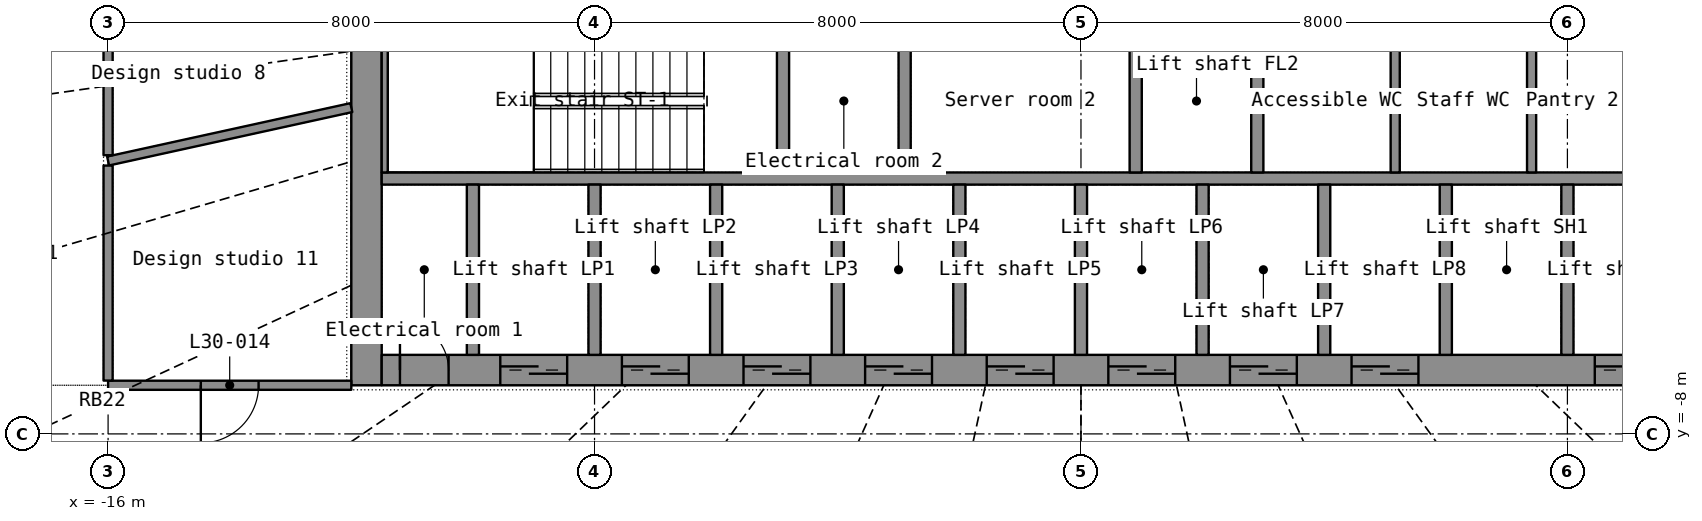
"""IFC4 building model, lengths in metres.
Left out: names, types, materials, properties, quantities, classifications, styles, units other than length and angle.
Written with IfcOpenShell. Run it as: python <this file> out.ifc"""

import sys

from ifc_helpers import new_model, si_unit, direction, frame, frame_2d, origin, place, context, subcontext, project, spatial, rectangle, extrude, element, fill, save


model = new_model("IFC4")
c1 = context("Model", 3, precision=1e-05, world=origin(), true_north=direction((0.0, 1.0)))
c2 = subcontext(c1, "Body", "Model", "MODEL_VIEW")
j1 = project(units=[si_unit("LENGTHUNIT", "METRE"), si_unit("PLANEANGLEUNIT", "RADIAN")], contexts=[c1])
p1 = place(None, origin())
s1 = spatial("IfcSite", under=j1, at=p1, CompositionType="ELEMENT")
p2 = place(p1, origin())
s2 = spatial("IfcBuilding", under=s1, at=p2, CompositionType="ELEMENT")
p3 = place(p2, frame((0.0, 0.0, 126.7)))
s3 = spatial("IfcBuildingStorey", under=s2, at=p3, CompositionType="ELEMENT", Elevation=126.7)
p4 = place(p3, frame((-11.75, -7.2, 0.0), z_axis=(0.0, 0.0, 1.0), x_axis=(0.0, 1.0, 0.0)))
e1 = element("IfcWall", 1, at=p4, inside=s3, PredefinedType="SHEAR", context=c2, shape_type="SweptSolid", body=[
    extrude(rectangle(XDim=14.4, YDim=0.5, at=frame_2d((7.2, 0.0))), origin(), (0.0, 0.0, 1.0), 3.3),
])
p5 = place(p4, frame((6.5, 0.0, 0.0)))
e2 = element("IfcOpeningElement", 2, at=p5, cuts=e1, PredefinedType="OPENING", context=c2, shape_type="SweptSolid", body=[
    extrude(rectangle(XDim=1.4, YDim=2.2, at=frame_2d((0.7, 1.1))), frame((0.0, 0.26, 0.0), z_axis=(0.0, -1.0, 0.0), x_axis=(1.0, 0.0, 0.0)), (0.0, 0.0, 1.0), 0.52),
])
p6 = place(p3, frame((-11.5, -6.95, 0.0), z_axis=(0.0, 0.0, 1.0), x_axis=(1.0, 0.0, 0.0)))
e3 = element("IfcWall", 3, at=p6, inside=s3, PredefinedType="SHEAR", context=c2, shape_type="SweptSolid", body=[
    extrude(rectangle(XDim=23.0, YDim=0.5, at=frame_2d((11.5, 0.0))), origin(), (0.0, 0.0, 1.0), 3.3),
])
p7 = place(p6, frame((1.95, 0.0, 0.0)))
e4 = element("IfcOpeningElement", 4, at=p7, cuts=e3, PredefinedType="OPENING", context=c2, shape_type="SweptSolid", body=[
    extrude(rectangle(XDim=1.1, YDim=2.2, at=frame_2d((0.55, 1.1))), frame((0.0, 0.26, 0.0), z_axis=(0.0, -1.0, 0.0), x_axis=(1.0, 0.0, 0.0)), (0.0, 0.0, 1.0), 0.52),
])
p8 = place(p6, frame((3.95, 0.0, 0.0)))
e5 = element("IfcOpeningElement", 5, at=p8, cuts=e3, PredefinedType="OPENING", context=c2, shape_type="SweptSolid", body=[
    extrude(rectangle(XDim=1.1, YDim=2.2, at=frame_2d((0.55, 1.1))), frame((0.0, 0.26, 0.0), z_axis=(0.0, -1.0, 0.0), x_axis=(1.0, 0.0, 0.0)), (0.0, 0.0, 1.0), 0.52),
])
p9 = place(p6, frame((5.95, 0.0, 0.0)))
e6 = element("IfcOpeningElement", 6, at=p9, cuts=e3, PredefinedType="OPENING", context=c2, shape_type="SweptSolid", body=[
    extrude(rectangle(XDim=1.1, YDim=2.2, at=frame_2d((0.55, 1.1))), frame((0.0, 0.26, 0.0), z_axis=(0.0, -1.0, 0.0), x_axis=(1.0, 0.0, 0.0)), (0.0, 0.0, 1.0), 0.52),
])
p10 = place(p6, frame((7.95, 0.0, 0.0)))
e7 = element("IfcOpeningElement", 7, at=p10, cuts=e3, PredefinedType="OPENING", context=c2, shape_type="SweptSolid", body=[
    extrude(rectangle(XDim=1.1, YDim=2.2, at=frame_2d((0.55, 1.1))), frame((0.0, 0.26, 0.0), z_axis=(0.0, -1.0, 0.0), x_axis=(1.0, 0.0, 0.0)), (0.0, 0.0, 1.0), 0.52),
])
p11 = place(p6, frame((9.95, 0.0, 0.0)))
e8 = element("IfcOpeningElement", 8, at=p11, cuts=e3, PredefinedType="OPENING", context=c2, shape_type="SweptSolid", body=[
    extrude(rectangle(XDim=1.1, YDim=2.2, at=frame_2d((0.55, 1.1))), frame((0.0, 0.26, 0.0), z_axis=(0.0, -1.0, 0.0), x_axis=(1.0, 0.0, 0.0)), (0.0, 0.0, 1.0), 0.52),
])
p12 = place(p6, frame((11.95, 0.0, 0.0)))
e9 = element("IfcOpeningElement", 9, at=p12, cuts=e3, PredefinedType="OPENING", context=c2, shape_type="SweptSolid", body=[
    extrude(rectangle(XDim=1.1, YDim=2.2, at=frame_2d((0.55, 1.1))), frame((0.0, 0.26, 0.0), z_axis=(0.0, -1.0, 0.0), x_axis=(1.0, 0.0, 0.0)), (0.0, 0.0, 1.0), 0.52),
])
p13 = place(p6, frame((13.95, 0.0, 0.0)))
e10 = element("IfcOpeningElement", 10, at=p13, cuts=e3, PredefinedType="OPENING", context=c2, shape_type="SweptSolid", body=[
    extrude(rectangle(XDim=1.1, YDim=2.2, at=frame_2d((0.55, 1.1))), frame((0.0, 0.26, 0.0), z_axis=(0.0, -1.0, 0.0), x_axis=(1.0, 0.0, 0.0)), (0.0, 0.0, 1.0), 0.52),
])
p14 = place(p6, frame((15.95, 0.0, 0.0)))
e11 = element("IfcOpeningElement", 11, at=p14, cuts=e3, PredefinedType="OPENING", context=c2, shape_type="SweptSolid", body=[
    extrude(rectangle(XDim=1.1, YDim=2.2, at=frame_2d((0.55, 1.1))), frame((0.0, 0.26, 0.0), z_axis=(0.0, -1.0, 0.0), x_axis=(1.0, 0.0, 0.0)), (0.0, 0.0, 1.0), 0.52),
])
p15 = place(p6, frame((19.95, 0.0, 0.0)))
e12 = element("IfcOpeningElement", 12, at=p15, cuts=e3, PredefinedType="OPENING", context=c2, shape_type="SweptSolid", body=[
    extrude(rectangle(XDim=1.1, YDim=2.2, at=frame_2d((0.55, 1.1))), frame((0.0, 0.26, 0.0), z_axis=(0.0, -1.0, 0.0), x_axis=(1.0, 0.0, 0.0)), (0.0, 0.0, 1.0), 0.52),
])
p16 = place(p6, frame((0.3, 0.0, 0.0)))
e13 = element("IfcOpeningElement", 13, at=p16, cuts=e3, PredefinedType="OPENING", context=c2, shape_type="SweptSolid", body=[
    extrude(rectangle(XDim=0.8, YDim=2.05, at=frame_2d((0.4, 1.025))), frame((0.0, 0.26, 0.0), z_axis=(0.0, -1.0, 0.0), x_axis=(1.0, 0.0, 0.0)), (0.0, 0.0, 1.0), 0.52),
])
p17 = place(p6, frame((21.9, 0.0, 0.0)))
e14 = element("IfcOpeningElement", 14, at=p17, cuts=e3, PredefinedType="OPENING", context=c2, shape_type="SweptSolid", body=[
    extrude(rectangle(XDim=0.8, YDim=2.05, at=frame_2d((0.4, 1.025))), frame((0.0, 0.26, 0.0), z_axis=(0.0, -1.0, 0.0), x_axis=(1.0, 0.0, 0.0)), (0.0, 0.0, 1.0), 0.52),
])
p18 = place(p3, frame((-11.5, -3.8, 0.0), z_axis=(0.0, 0.0, 1.0), x_axis=(1.0, 0.0, 0.0)))
e15 = element("IfcWall", 15, at=p18, inside=s3, PredefinedType="SHEAR", context=c2, shape_type="SweptSolid", body=[
    extrude(rectangle(XDim=23.0, YDim=0.2, at=frame_2d((11.5, 0.0))), origin(), (0.0, 0.0, 1.0), 3.3),
])
for number, where, z_axis, x_axis in (
    (16, (-10.0, -6.7, 0.0), (0.0, 0.0, 1.0), (0.0, 1.0, 0.0)),
    (17, (-8.0, -6.7, 0.0), (0.0, 0.0, 1.0), (0.0, 1.0, 0.0)),
    (18, (-6.0, -6.7, 0.0), (0.0, 0.0, 1.0), (0.0, 1.0, 0.0)),
    (19, (-4.0, -6.7, 0.0), (0.0, 0.0, 1.0), (0.0, 1.0, 0.0)),
    (20, (-2.0, -6.7, 0.0), (0.0, 0.0, 1.0), (0.0, 1.0, 0.0)),
    (21, (0.0, -6.7, 0.0), (0.0, 0.0, 1.0), (0.0, 1.0, 0.0)),
    (22, (2.0, -6.7, 0.0), (0.0, 0.0, 1.0), (0.0, 1.0, 0.0)),
    (23, (4.0, -6.7, 0.0), (0.0, 0.0, 1.0), (0.0, 1.0, 0.0)),
    (24, (6.0, -6.7, 0.0), (0.0, 0.0, 1.0), (0.0, 1.0, 0.0)),
    (25, (8.0, -6.7, 0.0), (0.0, 0.0, 1.0), (0.0, 1.0, 0.0)),
):
    element("IfcWall", number, at=place(p3, frame(where, z_axis=z_axis, x_axis=x_axis)), inside=s3, PredefinedType="SHEAR", context=c2, shape_type="SweptSolid", body=[
        extrude(rectangle(XDim=2.8, YDim=0.2, at=frame_2d((1.4, 0.0))), origin(), (0.0, 0.0, 1.0), 3.3),
    ])
p19 = place(p3, frame((-2.9, -3.7, 0.0), z_axis=(0.0, 0.0, 1.0), x_axis=(0.0, 1.0, 0.0)))
e26 = element("IfcWall", 26, at=p19, inside=s3, PredefinedType="SHEAR", context=c2, shape_type="SweptSolid", body=[
    extrude(rectangle(XDim=7.4, YDim=0.2, at=frame_2d((3.7, 0.0))), origin(), (0.0, 0.0, 1.0), 3.3),
])
p20 = place(p19, frame((3.1, 0.0, 0.0)))
e27 = element("IfcOpeningElement", 27, at=p20, cuts=e26, PredefinedType="OPENING", context=c2, shape_type="SweptSolid", body=[
    extrude(rectangle(XDim=1.2, YDim=2.2, at=frame_2d((0.6, 1.1))), frame((0.0, 0.11, 0.0), z_axis=(0.0, -1.0, 0.0), x_axis=(1.0, 0.0, 0.0)), (0.0, 0.0, 1.0), 0.22),
])
p21 = place(p3, frame((2.9, -3.7, 0.0), z_axis=(0.0, 0.0, 1.0), x_axis=(0.0, 1.0, 0.0)))
e28 = element("IfcWall", 28, at=p21, inside=s3, PredefinedType="SHEAR", context=c2, shape_type="SweptSolid", body=[
    extrude(rectangle(XDim=7.4, YDim=0.2, at=frame_2d((3.7, 0.0))), origin(), (0.0, 0.0, 1.0), 3.3),
])
p22 = place(p21, frame((3.1, 0.0, 0.0)))
e29 = element("IfcOpeningElement", 29, at=p22, cuts=e28, PredefinedType="OPENING", context=c2, shape_type="SweptSolid", body=[
    extrude(rectangle(XDim=1.2, YDim=2.2, at=frame_2d((0.6, 1.1))), frame((0.0, 0.11, 0.0), z_axis=(0.0, -1.0, 0.0), x_axis=(1.0, 0.0, 0.0)), (0.0, 0.0, 1.0), 0.22),
])
p23 = place(p3, frame((0.9, -3.7, 0.0), z_axis=(0.0, 0.0, 1.0), x_axis=(0.0, 1.0, 0.0)))
e30 = element("IfcWall", 30, at=p23, inside=s3, PredefinedType="SHEAR", context=c2, shape_type="SweptSolid", body=[
    extrude(rectangle(XDim=2.35, YDim=0.2, at=frame_2d((1.175, 0.0))), origin(), (0.0, 0.0, 1.0), 3.3),
])
p24 = place(p3, frame((-11.45, -3.7, 0.0), z_axis=(0.0, 0.0, 1.0), x_axis=(0.0, 1.0, 0.0)))
e31 = element("IfcWall", 31, at=p24, inside=s3, PredefinedType="SHEAR", context=c2, shape_type="SweptSolid", body=[
    extrude(rectangle(XDim=2.35, YDim=0.1, at=frame_2d((1.175, 0.0))), origin(), (0.0, 0.0, 1.0), 3.3),
])
p25 = place(p3, frame((-4.9, -3.7, 0.0), z_axis=(0.0, 0.0, 1.0), x_axis=(0.0, 1.0, 0.0)))
e32 = element("IfcWall", 32, at=p25, inside=s3, PredefinedType="SHEAR", context=c2, shape_type="SweptSolid", body=[
    extrude(rectangle(XDim=2.35, YDim=0.2, at=frame_2d((1.175, 0.0))), origin(), (0.0, 0.0, 1.0), 3.3),
])
for number, where, z_axis, x_axis in (
    (33, (5.168, -3.7, 0.0), (0.0, 0.0, 1.0), (0.0, 1.0, 0.0)),
    (34, (7.411, -3.7, 0.0), (0.0, 0.0, 1.0), (0.0, 1.0, 0.0)),
):
    element("IfcWall", number, at=place(p3, frame(where, z_axis=z_axis, x_axis=x_axis)), inside=s3, PredefinedType="PARTITIONING", context=c2, shape_type="SweptSolid", body=[
        extrude(rectangle(XDim=2.35, YDim=0.15, at=frame_2d((1.175, 0.0))), origin(), (0.0, 0.0, 1.0), 3.3),
    ])
p26 = place(p3, frame((-16.0, -3.512, 0.0), z_axis=(0.0, 0.0, 1.0), x_axis=(0.976750433, 0.214379551, 0.0)))
e35 = element("IfcWall", 35, at=p26, inside=s3, PredefinedType="PARTITIONING", context=c2, shape_type="SweptSolid", body=[
    extrude(rectangle(XDim=4.095, YDim=0.15, at=frame_2d((2.048, 0.0))), origin(), (0.0, 0.0, 1.0), 2.4),
])
p27 = place(p3, frame((-12.0, -7.2, 0.0), z_axis=(0.0, 0.0, 1.0), x_axis=(-1.0, 0.0, 0.0)))
e36 = element("IfcWall", 36, at=p27, inside=s3, PredefinedType="PARTITIONING", context=c2, shape_type="SweptSolid", body=[
    extrude(rectangle(XDim=4.0, YDim=0.15, at=frame_2d((2.0, 0.0))), origin(), (0.0, 0.0, 1.0), 2.4),
])
p28 = place(p27, frame((1.525, 0.0, 0.0)))
e37 = element("IfcOpeningElement", 37, at=p28, cuts=e36, PredefinedType="OPENING", context=c2, shape_type="SweptSolid", body=[
    extrude(rectangle(XDim=0.95, YDim=2.15, at=frame_2d((0.475, 1.075))), frame((0.0, 0.085, 0.0), z_axis=(0.0, -1.0, 0.0), x_axis=(1.0, 0.0, 0.0)), (0.0, 0.0, 1.0), 0.17),
])
p29 = place(p3, frame((-16.0, -7.123, 0.0), z_axis=(0.0, 0.0, 1.0), x_axis=(0.0, 1.0, 0.0)))
e38 = element("IfcWall", 38, at=p29, inside=s3, PredefinedType="PARTITIONING", context=c2, shape_type="SweptSolid", body=[
    extrude(rectangle(XDim=3.536, YDim=0.15, at=frame_2d((1.768, 0.0))), origin(), (0.0, 0.0, 1.0), 2.4),
])
p30 = place(p3, frame((-16.0, -3.417, 0.0), z_axis=(0.0, 0.0, 1.0), x_axis=(0.0, 1.0, 0.0)))
e39 = element("IfcWall", 39, at=p30, inside=s3, PredefinedType="PARTITIONING", context=c2, shape_type="SweptSolid", body=[
    extrude(rectangle(XDim=2.439, YDim=0.15, at=frame_2d((1.22, 0.0))), origin(), (0.0, 0.0, 1.0), 2.4),
])
p31 = place(p7, origin())
e40 = element("IfcDoor", 40, at=p31, inside=s3, OperationType="DOUBLE_DOOR_SLIDING", PredefinedType="DOOR", context=c2, shape_type="SweptSolid", body=[
    extrude(rectangle(XDim=1.1, YDim=2.2, at=frame_2d((0.55, 1.1))), frame((0.0, 0.025, 0.0), z_axis=(0.0, -1.0, 0.0), x_axis=(1.0, 0.0, 0.0)), (0.0, 0.0, 1.0), 0.05),
])
fill(e4, e40)
p32 = place(p8, origin())
e41 = element("IfcDoor", 41, at=p32, inside=s3, OperationType="DOUBLE_DOOR_SLIDING", PredefinedType="DOOR", context=c2, shape_type="SweptSolid", body=[
    extrude(rectangle(XDim=1.1, YDim=2.2, at=frame_2d((0.55, 1.1))), frame((0.0, 0.025, 0.0), z_axis=(0.0, -1.0, 0.0), x_axis=(1.0, 0.0, 0.0)), (0.0, 0.0, 1.0), 0.05),
])
fill(e5, e41)
p33 = place(p9, origin())
e42 = element("IfcDoor", 42, at=p33, inside=s3, OperationType="DOUBLE_DOOR_SLIDING", PredefinedType="DOOR", context=c2, shape_type="SweptSolid", body=[
    extrude(rectangle(XDim=1.1, YDim=2.2, at=frame_2d((0.55, 1.1))), frame((0.0, 0.025, 0.0), z_axis=(0.0, -1.0, 0.0), x_axis=(1.0, 0.0, 0.0)), (0.0, 0.0, 1.0), 0.05),
])
fill(e6, e42)
p34 = place(p10, origin())
e43 = element("IfcDoor", 43, at=p34, inside=s3, OperationType="DOUBLE_DOOR_SLIDING", PredefinedType="DOOR", context=c2, shape_type="SweptSolid", body=[
    extrude(rectangle(XDim=1.1, YDim=2.2, at=frame_2d((0.55, 1.1))), frame((0.0, 0.025, 0.0), z_axis=(0.0, -1.0, 0.0), x_axis=(1.0, 0.0, 0.0)), (0.0, 0.0, 1.0), 0.05),
])
fill(e7, e43)
p35 = place(p11, origin())
e44 = element("IfcDoor", 44, at=p35, inside=s3, OperationType="DOUBLE_DOOR_SLIDING", PredefinedType="DOOR", context=c2, shape_type="SweptSolid", body=[
    extrude(rectangle(XDim=1.1, YDim=2.2, at=frame_2d((0.55, 1.1))), frame((0.0, 0.025, 0.0), z_axis=(0.0, -1.0, 0.0), x_axis=(1.0, 0.0, 0.0)), (0.0, 0.0, 1.0), 0.05),
])
fill(e8, e44)
p36 = place(p12, origin())
e45 = element("IfcDoor", 45, at=p36, inside=s3, OperationType="DOUBLE_DOOR_SLIDING", PredefinedType="DOOR", context=c2, shape_type="SweptSolid", body=[
    extrude(rectangle(XDim=1.1, YDim=2.2, at=frame_2d((0.55, 1.1))), frame((0.0, 0.025, 0.0), z_axis=(0.0, -1.0, 0.0), x_axis=(1.0, 0.0, 0.0)), (0.0, 0.0, 1.0), 0.05),
])
fill(e9, e45)
p37 = place(p13, origin())
e46 = element("IfcDoor", 46, at=p37, inside=s3, OperationType="DOUBLE_DOOR_SLIDING", PredefinedType="DOOR", context=c2, shape_type="SweptSolid", body=[
    extrude(rectangle(XDim=1.1, YDim=2.2, at=frame_2d((0.55, 1.1))), frame((0.0, 0.025, 0.0), z_axis=(0.0, -1.0, 0.0), x_axis=(1.0, 0.0, 0.0)), (0.0, 0.0, 1.0), 0.05),
])
fill(e10, e46)
p38 = place(p14, origin())
e47 = element("IfcDoor", 47, at=p38, inside=s3, OperationType="DOUBLE_DOOR_SLIDING", PredefinedType="DOOR", context=c2, shape_type="SweptSolid", body=[
    extrude(rectangle(XDim=1.1, YDim=2.2, at=frame_2d((0.55, 1.1))), frame((0.0, 0.025, 0.0), z_axis=(0.0, -1.0, 0.0), x_axis=(1.0, 0.0, 0.0)), (0.0, 0.0, 1.0), 0.05),
])
fill(e11, e47)
p39 = place(p15, origin())
e48 = element("IfcDoor", 48, at=p39, inside=s3, OperationType="DOUBLE_DOOR_SLIDING", PredefinedType="DOOR", context=c2, shape_type="SweptSolid", body=[
    extrude(rectangle(XDim=1.1, YDim=2.2, at=frame_2d((0.55, 1.1))), frame((0.0, 0.025, 0.0), z_axis=(0.0, -1.0, 0.0), x_axis=(1.0, 0.0, 0.0)), (0.0, 0.0, 1.0), 0.05),
])
fill(e12, e48)
p40 = place(p16, origin())
e49 = element("IfcDoor", 49, at=p40, inside=s3, OperationType="SINGLE_SWING_LEFT", PredefinedType="DOOR", context=c2, shape_type="SweptSolid", body=[
    extrude(rectangle(XDim=0.8, YDim=2.05, at=frame_2d((0.4, 1.025))), frame((0.0, 0.025, 0.0), z_axis=(0.0, -1.0, 0.0), x_axis=(1.0, 0.0, 0.0)), (0.0, 0.0, 1.0), 0.05),
])
fill(e13, e49)
p41 = place(p28, origin())
e50 = element("IfcDoor", 50, at=p41, inside=s3, OperationType="SINGLE_SWING_RIGHT", PredefinedType="DOOR", context=c2, shape_type="SweptSolid", body=[
    extrude(rectangle(XDim=0.95, YDim=2.15, at=frame_2d((0.475, 1.075))), frame((0.0, 0.025, 0.0), z_axis=(0.0, -1.0, 0.0), x_axis=(1.0, 0.0, 0.0)), (0.0, 0.0, 1.0), 0.05),
])
fill(e37, e50)
save(model, sys.argv[1])
